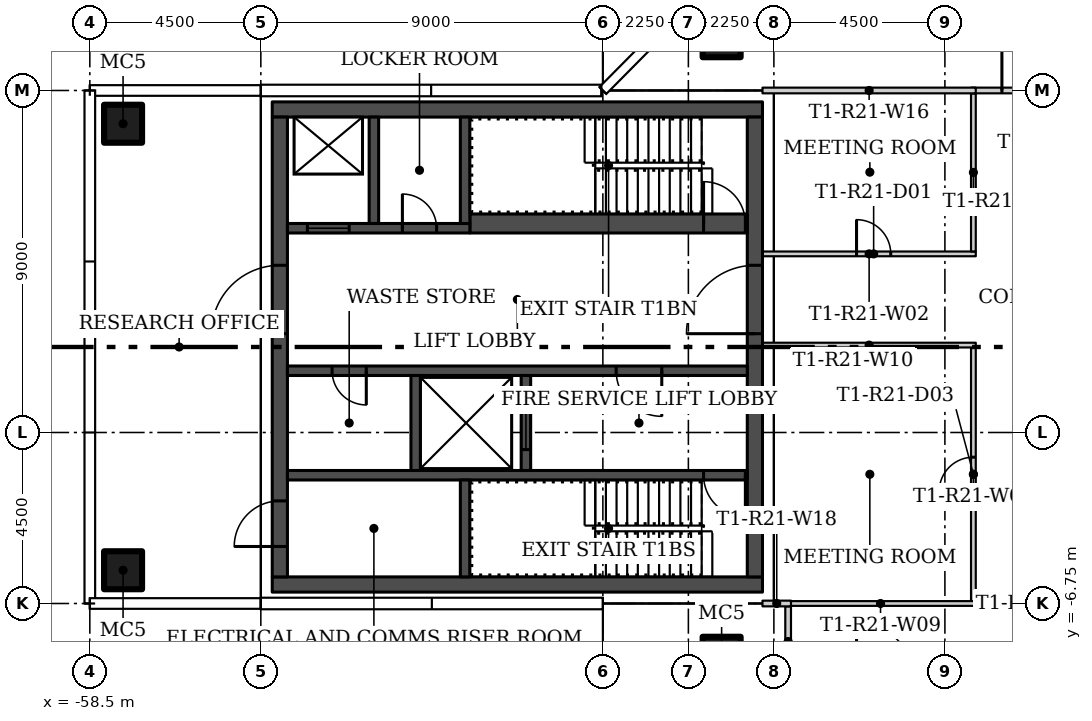
"""IFC4 building model, lengths in metres.
Left out: names, types, materials, properties, quantities, classifications, styles, units other than length and angle.
Written with IfcOpenShell. Run it as: python <this file> out.ifc"""

import sys

from ifc_helpers import new_model, si_unit, direction, frame, frame_2d, origin, origin_2d, place, context, subcontext, project, spatial, rectangle, hollow_rectangle, extrude, element, fill, save


model = new_model("IFC4")
c1 = context("Model", 3, precision=1e-05, world=origin(), true_north=direction((0.0, 1.0)))
c2 = subcontext(c1, "Body", "Model", "MODEL_VIEW")
j1 = project(units=[si_unit("LENGTHUNIT", "METRE"), si_unit("PLANEANGLEUNIT", "RADIAN")], contexts=[c1])
p1 = place(None, origin())
s1 = spatial("IfcSite", under=j1, at=p1, CompositionType="ELEMENT")
p2 = place(p1, origin())
s2 = spatial("IfcBuilding", under=s1, at=p2, CompositionType="ELEMENT")
p3 = place(p2, frame((0.0, 0.0, 194.4)))
s3 = spatial("IfcBuildingStorey", under=s2, at=p3, CompositionType="ELEMENT", Elevation=194.4)
for number, where in (
    (1, (-41.875, 8.125, 0.0)),
    (2, (-41.875, -8.125, 0.0)),
    (3, (-57.625, -5.875, 0.0)),
    (4, (-57.625, 5.875, 0.0)),
):
    element("IfcColumn", number, at=place(p3, frame(where)), inside=s3, PredefinedType="COLUMN", context=c2, shape_type="SweptSolid", body=[
        extrude(hollow_rectangle(XDim=1.0, YDim=1.0, WallThickness=0.04, at=origin_2d()), origin(), (0.0, 0.0, 1.0), 3.55),
    ])
p4 = place(p3, frame((-40.8, 2.45, 0.0)))
e5 = element("IfcWall", 5, at=p4, inside=s3, PredefinedType="PARTITIONING", context=c2, shape_type="SweptSolid", body=[
    extrude(rectangle(XDim=5.613, YDim=0.125, at=frame_2d((2.806, 0.0))), origin(), (0.0, 0.0, 1.0), 3.55),
])
p5 = place(p4, frame((2.475, 0.0, 0.0)))
e6 = element("IfcOpeningElement", 6, at=p5, cuts=e5, PredefinedType="OPENING", context=c2, shape_type="SweptSolid", body=[
    extrude(rectangle(XDim=0.9, YDim=2.1, at=frame_2d((0.45, 1.05))), frame((0.0, 0.073, 0.0), z_axis=(0.0, -1.0, 0.0), x_axis=(1.0, 0.0, 0.0)), (0.0, 0.0, 1.0), 0.145),
])
p6 = place(p3, frame((-35.25, -6.688, 0.0), z_axis=(0.0, 0.0, 1.0), x_axis=(0.0, 1.0, 0.0)))
e7 = element("IfcWall", 7, at=p6, inside=s3, PredefinedType="PARTITIONING", context=c2, shape_type="SweptSolid", body=[
    extrude(rectangle(XDim=6.675, YDim=0.125, at=frame_2d((3.337, 0.0))), origin(), (0.0, 0.0, 1.0), 3.55),
])
p7 = place(p6, frame((2.887, 0.0, 0.0)))
e8 = element("IfcOpeningElement", 8, at=p7, cuts=e7, PredefinedType="OPENING", context=c2, shape_type="SweptSolid", body=[
    extrude(rectangle(XDim=0.9, YDim=2.1, at=frame_2d((0.45, 1.05))), frame((0.0, 0.073, 0.0), z_axis=(0.0, -1.0, 0.0), x_axis=(1.0, 0.0, 0.0)), (0.0, 0.0, 1.0), 0.145),
])
p8 = place(p3, frame((-35.25, 2.513, 0.0), z_axis=(0.0, 0.0, 1.0), x_axis=(0.0, 1.0, 0.0)))
e9 = element("IfcWall", 9, at=p8, inside=s3, PredefinedType="PARTITIONING", context=c2, shape_type="SweptSolid", body=[
    extrude(rectangle(XDim=4.162, YDim=0.125, at=frame_2d((2.081, 0.0))), origin(), (0.0, 0.0, 1.0), 3.55),
])
p9 = place(p3, frame((-40.2, -6.75, 0.0)))
e10 = element("IfcWall", 10, at=p9, inside=s3, PredefinedType="PARTITIONING", context=c2, shape_type="SweptSolid", body=[
    extrude(rectangle(XDim=5.012, YDim=0.125, at=frame_2d((2.506, 0.0))), origin(), (0.0, 0.0, 1.0), 3.55),
])
p10 = place(p3, frame((-35.188, 0.05, 0.0), z_axis=(0.0, 0.0, 1.0), x_axis=(-1.0, 0.0, 0.0)))
e11 = element("IfcWall", 11, at=p10, inside=s3, PredefinedType="PARTITIONING", context=c2, shape_type="SweptSolid", body=[
    extrude(rectangle(XDim=5.613, YDim=0.125, at=frame_2d((2.806, 0.0))), origin(), (0.0, 0.0, 1.0), 3.55),
])
p11 = place(p3, frame((-35.312, 6.75, 0.0)))
e12 = element("IfcWall", 12, at=p11, inside=s3, PredefinedType="PARTITIONING", context=c2, shape_type="SweptSolid", body=[
    extrude(rectangle(XDim=3.125, YDim=0.15, at=frame_2d((1.562, 0.0))), origin(), (0.0, 0.0, 1.0), 3.55),
])
p12 = place(p11, frame((0.812, 0.0, 0.0)))
e13 = element("IfcOpeningElement", 13, at=p12, cuts=e12, PredefinedType="OPENING", context=c2, shape_type="SweptSolid", body=[
    extrude(rectangle(XDim=1.5, YDim=2.1, at=frame_2d((0.75, 1.05))), frame((0.0, 0.085, 0.0), z_axis=(0.0, -1.0, 0.0), x_axis=(1.0, 0.0, 0.0)), (0.0, 0.0, 1.0), 0.17),
])
p13 = place(p3, frame((-40.125, -6.825, 0.0), z_axis=(0.0, 0.0, 1.0), x_axis=(0.0, -1.0, 0.0)))
e14 = element("IfcWall", 14, at=p13, inside=s3, PredefinedType="PARTITIONING", context=c2, shape_type="SweptSolid", body=[
    extrude(rectangle(XDim=1.85, YDim=0.15, at=frame_2d((0.925, 0.0))), origin(), (0.0, 0.0, 1.0), 3.55),
])
p14 = place(p3, frame((-35.188, 6.75, 0.0), z_axis=(0.0, 0.0, 1.0), x_axis=(-1.0, 0.0, 0.0)))
e15 = element("IfcWall", 15, at=p14, inside=s3, PredefinedType="PARTITIONING", context=c2, shape_type="SweptSolid", body=[
    extrude(rectangle(XDim=5.613, YDim=0.15, at=frame_2d((2.806, 0.0))), origin(), (0.0, 0.0, 1.0), 3.55),
])
p15 = place(p3, frame((-40.8, -6.75, 0.0)))
e16 = element("IfcWall", 16, at=p15, inside=s3, PredefinedType="PARTITIONING", context=c2, shape_type="SweptSolid", body=[
    extrude(rectangle(XDim=0.75, YDim=0.15, at=frame_2d((0.375, 0.0))), origin(), (0.0, 0.0, 1.0), 3.55),
])
for number, where, z_axis, x_axis in (
    (17, (-40.8, -6.25, 0.0), (0.0, 0.0, 1.0), (-1.0, 0.0, 0.0)),
    (18, (-40.8, 6.25, 0.0), (0.0, 0.0, 1.0), (-1.0, 0.0, 0.0)),
):
    element("IfcWall", number, at=place(p3, frame(where, z_axis=z_axis, x_axis=x_axis)), inside=s3, PredefinedType="SHEAR", context=c2, shape_type="SweptSolid", body=[
        extrude(rectangle(XDim=12.9, YDim=0.4, at=frame_2d((6.45, 0.0))), origin(), (0.0, 0.0, 1.0), 3.55),
    ])
p16 = place(p3, frame((-41.0, -6.05, 0.0), z_axis=(0.0, 0.0, 1.0), x_axis=(0.0, 1.0, 0.0)))
e19 = element("IfcWall", 19, at=p16, inside=s3, PredefinedType="SHEAR", context=c2, shape_type="SweptSolid", body=[
    extrude(rectangle(XDim=12.1, YDim=0.4, at=frame_2d((6.05, 0.0))), origin(), (0.0, 0.0, 1.0), 3.55),
])
p17 = place(p16, frame((6.4, 0.0, 0.0)))
e20 = element("IfcOpeningElement", 20, at=p17, cuts=e19, PredefinedType="OPENING", context=c2, shape_type="SweptSolid", body=[
    extrude(rectangle(XDim=1.8, YDim=2.4, at=frame_2d((0.9, 1.2))), frame((0.0, 0.21, 0.0), z_axis=(0.0, -1.0, 0.0), x_axis=(1.0, 0.0, 0.0)), (0.0, 0.0, 1.0), 0.42),
])
p18 = place(p3, frame((-53.5, -6.05, 0.0), z_axis=(0.0, 0.0, 1.0), x_axis=(0.0, 1.0, 0.0)))
e21 = element("IfcWall", 21, at=p18, inside=s3, PredefinedType="SHEAR", context=c2, shape_type="SweptSolid", body=[
    extrude(rectangle(XDim=12.1, YDim=0.4, at=frame_2d((6.05, 0.0))), origin(), (0.0, 0.0, 1.0), 3.55),
])
p19 = place(p18, frame((0.8, 0.0, 0.0)))
e22 = element("IfcOpeningElement", 22, at=p19, cuts=e21, PredefinedType="OPENING", context=c2, shape_type="SweptSolid", body=[
    extrude(rectangle(XDim=1.2, YDim=2.1, at=frame_2d((0.6, 1.05))), frame((0.0, 0.21, 0.0), z_axis=(0.0, -1.0, 0.0), x_axis=(1.0, 0.0, 0.0)), (0.0, 0.0, 1.0), 0.42),
])
p20 = place(p18, frame((6.4, 0.0, 0.0)))
e23 = element("IfcOpeningElement", 23, at=p20, cuts=e21, PredefinedType="OPENING", context=c2, shape_type="SweptSolid", body=[
    extrude(rectangle(XDim=1.8, YDim=2.4, at=frame_2d((0.9, 1.2))), frame((0.0, 0.21, 0.0), z_axis=(0.0, -1.0, 0.0), x_axis=(1.0, 0.0, 0.0)), (0.0, 0.0, 1.0), 0.42),
])
p21 = place(p3, frame((-41.2, -3.375, 0.0), z_axis=(0.0, 0.0, 1.0), x_axis=(-1.0, 0.0, 0.0)))
e24 = element("IfcWall", 24, at=p21, inside=s3, PredefinedType="SHEAR", context=c2, shape_type="SweptSolid", body=[
    extrude(rectangle(XDim=12.1, YDim=0.25, at=frame_2d((6.05, 0.0))), origin(), (0.0, 0.0, 1.0), 3.55),
])
p22 = place(p21, frame((0.05, 0.0, 0.0)))
e25 = element("IfcOpeningElement", 25, at=p22, cuts=e24, PredefinedType="OPENING", context=c2, shape_type="SweptSolid", body=[
    extrude(rectangle(XDim=1.1, YDim=2.1, at=frame_2d((0.55, 1.05))), frame((0.0, 0.135, 0.0), z_axis=(0.0, -1.0, 0.0), x_axis=(1.0, 0.0, 0.0)), (0.0, 0.0, 1.0), 0.27),
])
p23 = place(p3, frame((-48.625, -6.05, 0.0), z_axis=(0.0, 0.0, 1.0), x_axis=(0.0, 1.0, 0.0)))
e26 = element("IfcWall", 26, at=p23, inside=s3, PredefinedType="SHEAR", context=c2, shape_type="SweptSolid", body=[
    extrude(rectangle(XDim=2.55, YDim=0.25, at=frame_2d((1.275, 0.0))), origin(), (0.0, 0.0, 1.0), 3.55),
])
p24 = place(p3, frame((-41.2, -0.625, 0.0), z_axis=(0.0, 0.0, 1.0), x_axis=(-1.0, 0.0, 0.0)))
e27 = element("IfcWall", 27, at=p24, inside=s3, PredefinedType="SHEAR", context=c2, shape_type="SweptSolid", body=[
    extrude(rectangle(XDim=12.1, YDim=0.25, at=frame_2d((6.05, 0.0))), origin(), (0.0, 0.0, 1.0), 3.55),
])
p25 = place(p24, frame((2.25, 0.0, 0.0)))
e28 = element("IfcOpeningElement", 28, at=p25, cuts=e27, PredefinedType="OPENING", context=c2, shape_type="SweptSolid", body=[
    extrude(rectangle(XDim=1.2, YDim=2.1, at=frame_2d((0.6, 1.05))), frame((0.0, 0.135, 0.0), z_axis=(0.0, -1.0, 0.0), x_axis=(1.0, 0.0, 0.0)), (0.0, 0.0, 1.0), 0.27),
])
p26 = place(p24, frame((10.025, 0.0, 0.0)))
e29 = element("IfcOpeningElement", 29, at=p26, cuts=e27, PredefinedType="OPENING", context=c2, shape_type="SweptSolid", body=[
    extrude(rectangle(XDim=0.9, YDim=2.1, at=frame_2d((0.45, 1.05))), frame((0.0, 0.135, 0.0), z_axis=(0.0, -1.0, 0.0), x_axis=(1.0, 0.0, 0.0)), (0.0, 0.0, 1.0), 0.27),
])
p27 = place(p3, frame((-47.025, -3.25, 0.0), z_axis=(0.0, 0.0, 1.0), x_axis=(0.0, 1.0, 0.0)))
e30 = element("IfcWall", 30, at=p27, inside=s3, PredefinedType="SHEAR", context=c2, shape_type="SweptSolid", body=[
    extrude(rectangle(XDim=2.5, YDim=0.25, at=frame_2d((1.25, 0.0))), origin(), (0.0, 0.0, 1.0), 3.55),
])
p28 = place(p27, frame((0.55, 0.0, 0.0)))
e31 = element("IfcOpeningElement", 31, at=p28, cuts=e30, PredefinedType="OPENING", context=c2, shape_type="SweptSolid", body=[
    extrude(rectangle(XDim=1.4, YDim=2.4, at=frame_2d((0.7, 1.2))), frame((0.0, 0.135, 0.0), z_axis=(0.0, -1.0, 0.0), x_axis=(1.0, 0.0, 0.0)), (0.0, 0.0, 1.0), 0.27),
])
p29 = place(p3, frame((-49.925, -3.25, 0.0), z_axis=(0.0, 0.0, 1.0), x_axis=(0.0, 1.0, 0.0)))
e32 = element("IfcWall", 32, at=p29, inside=s3, PredefinedType="SHEAR", context=c2, shape_type="SweptSolid", body=[
    extrude(rectangle(XDim=2.5, YDim=0.25, at=frame_2d((1.25, 0.0))), origin(), (0.0, 0.0, 1.0), 3.55),
])
p30 = place(p3, frame((-48.5, 3.25, 0.0)))
e33 = element("IfcWall", 33, at=p30, inside=s3, PredefinedType="SHEAR", context=c2, shape_type="SweptSolid", body=[
    extrude(rectangle(XDim=7.3, YDim=0.5, at=frame_2d((3.65, 0.0))), origin(), (0.0, 0.0, 1.0), 3.55),
])
p31 = place(p30, frame((6.15, 0.0, 0.0)))
e34 = element("IfcOpeningElement", 34, at=p31, cuts=e33, PredefinedType="OPENING", context=c2, shape_type="SweptSolid", body=[
    extrude(rectangle(XDim=1.1, YDim=2.1, at=frame_2d((0.55, 1.05))), frame((0.0, 0.26, 0.0), z_axis=(0.0, -1.0, 0.0), x_axis=(1.0, 0.0, 0.0)), (0.0, 0.0, 1.0), 0.52),
])
p32 = place(p3, frame((-53.3, 3.125, 0.0)))
e35 = element("IfcWall", 35, at=p32, inside=s3, PredefinedType="SHEAR", context=c2, shape_type="SweptSolid", body=[
    extrude(rectangle(XDim=4.8, YDim=0.25, at=frame_2d((2.4, 0.0))), origin(), (0.0, 0.0, 1.0), 3.55),
])
p33 = place(p32, frame((0.525, 0.0, 0.0)))
e36 = element("IfcOpeningElement", 36, at=p33, cuts=e35, PredefinedType="OPENING", context=c2, shape_type="SweptSolid", body=[
    extrude(rectangle(XDim=1.1, YDim=2.1, at=frame_2d((0.55, 1.05))), frame((0.0, 0.135, 0.0), z_axis=(0.0, -1.0, 0.0), x_axis=(1.0, 0.0, 0.0)), (0.0, 0.0, 1.0), 0.27),
])
p34 = place(p32, frame((3.025, 0.0, 0.0)))
e37 = element("IfcOpeningElement", 37, at=p34, cuts=e35, PredefinedType="OPENING", context=c2, shape_type="SweptSolid", body=[
    extrude(rectangle(XDim=0.9, YDim=2.1, at=frame_2d((0.45, 1.05))), frame((0.0, 0.135, 0.0), z_axis=(0.0, -1.0, 0.0), x_axis=(1.0, 0.0, 0.0)), (0.0, 0.0, 1.0), 0.27),
])
for number, where, z_axis, x_axis in (
    (38, (-48.625, 3.25, 0.0), (0.0, 0.0, 1.0), (0.0, 1.0, 0.0)),
    (39, (-51.025, 3.25, 0.0), (0.0, 0.0, 1.0), (0.0, 1.0, 0.0)),
):
    element("IfcWall", number, at=place(p3, frame(where, z_axis=z_axis, x_axis=x_axis)), inside=s3, PredefinedType="SHEAR", context=c2, shape_type="SweptSolid", body=[
        extrude(rectangle(XDim=2.8, YDim=0.25, at=frame_2d((1.4, 0.0))), origin(), (0.0, 0.0, 1.0), 3.55),
    ])
p35 = place(p5, origin())
e40 = element("IfcDoor", 40, at=p35, inside=s3, OperationType="SINGLE_SWING_LEFT", PredefinedType="DOOR", context=c2, shape_type="SweptSolid", body=[
    extrude(rectangle(XDim=0.9, YDim=2.1, at=frame_2d((0.45, 1.05))), frame((0.0, 0.025, 0.0), z_axis=(0.0, -1.0, 0.0), x_axis=(1.0, 0.0, 0.0)), (0.0, 0.0, 1.0), 0.05),
])
fill(e6, e40)
p36 = place(p7, origin())
e41 = element("IfcDoor", 41, at=p36, inside=s3, OperationType="SINGLE_SWING_LEFT", PredefinedType="DOOR", context=c2, shape_type="SweptSolid", body=[
    extrude(rectangle(XDim=0.9, YDim=2.1, at=frame_2d((0.45, 1.05))), frame((0.0, 0.025, 0.0), z_axis=(0.0, -1.0, 0.0), x_axis=(1.0, 0.0, 0.0)), (0.0, 0.0, 1.0), 0.05),
])
fill(e8, e41)
p37 = place(p12, origin())
e42 = element("IfcDoor", 42, at=p37, inside=s3, OperationType="DOUBLE_DOOR_SINGLE_SWING", PredefinedType="DOOR", context=c2, shape_type="SweptSolid", body=[
    extrude(rectangle(XDim=1.5, YDim=2.1, at=frame_2d((0.75, 1.05))), frame((0.0, 0.025, 0.0), z_axis=(0.0, -1.0, 0.0), x_axis=(1.0, 0.0, 0.0)), (0.0, 0.0, 1.0), 0.05),
])
fill(e13, e42)
p38 = place(p17, origin())
e43 = element("IfcDoor", 43, at=p38, inside=s3, OperationType="DOUBLE_DOOR_SINGLE_SWING", PredefinedType="DOOR", context=c2, shape_type="SweptSolid", body=[
    extrude(rectangle(XDim=1.8, YDim=2.4, at=frame_2d((0.9, 1.2))), frame((0.0, 0.025, 0.0), z_axis=(0.0, -1.0, 0.0), x_axis=(1.0, 0.0, 0.0)), (0.0, 0.0, 1.0), 0.05),
])
fill(e20, e43)
p39 = place(p19, origin())
e44 = element("IfcDoor", 44, at=p39, inside=s3, OperationType="SINGLE_SWING_LEFT", PredefinedType="DOOR", context=c2, shape_type="SweptSolid", body=[
    extrude(rectangle(XDim=1.2, YDim=2.1, at=frame_2d((0.6, 1.05))), frame((0.0, 0.025, 0.0), z_axis=(0.0, -1.0, 0.0), x_axis=(1.0, 0.0, 0.0)), (0.0, 0.0, 1.0), 0.05),
])
fill(e22, e44)
p40 = place(p20, origin())
e45 = element("IfcDoor", 45, at=p40, inside=s3, OperationType="DOUBLE_DOOR_SINGLE_SWING", PredefinedType="DOOR", context=c2, shape_type="SweptSolid", body=[
    extrude(rectangle(XDim=1.8, YDim=2.4, at=frame_2d((0.9, 1.2))), frame((0.0, 0.025, 0.0), z_axis=(0.0, -1.0, 0.0), x_axis=(1.0, 0.0, 0.0)), (0.0, 0.0, 1.0), 0.05),
])
fill(e23, e45)
p41 = place(p22, origin())
e46 = element("IfcDoor", 46, at=p41, inside=s3, OperationType="SINGLE_SWING_LEFT", PredefinedType="DOOR", context=c2, shape_type="SweptSolid", body=[
    extrude(rectangle(XDim=1.1, YDim=2.1, at=frame_2d((0.55, 1.05))), frame((0.0, 0.025, 0.0), z_axis=(0.0, -1.0, 0.0), x_axis=(1.0, 0.0, 0.0)), (0.0, 0.0, 1.0), 0.05),
])
fill(e25, e46)
p42 = place(p25, origin())
e47 = element("IfcDoor", 47, at=p42, inside=s3, OperationType="SINGLE_SWING_LEFT", PredefinedType="DOOR", context=c2, shape_type="SweptSolid", body=[
    extrude(rectangle(XDim=1.2, YDim=2.1, at=frame_2d((0.6, 1.05))), frame((0.0, 0.025, 0.0), z_axis=(0.0, -1.0, 0.0), x_axis=(1.0, 0.0, 0.0)), (0.0, 0.0, 1.0), 0.05),
])
fill(e28, e47)
p43 = place(p26, origin())
e48 = element("IfcDoor", 48, at=p43, inside=s3, OperationType="SINGLE_SWING_RIGHT", PredefinedType="DOOR", context=c2, shape_type="SweptSolid", body=[
    extrude(rectangle(XDim=0.9, YDim=2.1, at=frame_2d((0.45, 1.05))), frame((0.0, 0.025, 0.0), z_axis=(0.0, -1.0, 0.0), x_axis=(1.0, 0.0, 0.0)), (0.0, 0.0, 1.0), 0.05),
])
fill(e29, e48)
p44 = place(p28, origin())
e49 = element("IfcDoor", 49, at=p44, inside=s3, OperationType="SLIDING_TO_LEFT", PredefinedType="DOOR", context=c2, shape_type="SweptSolid", body=[
    extrude(rectangle(XDim=1.4, YDim=2.4, at=frame_2d((0.7, 1.2))), frame((0.0, 0.025, 0.0), z_axis=(0.0, -1.0, 0.0), x_axis=(1.0, 0.0, 0.0)), (0.0, 0.0, 1.0), 0.05),
])
fill(e31, e49)
p45 = place(p31, origin())
e50 = element("IfcDoor", 50, at=p45, inside=s3, OperationType="SINGLE_SWING_RIGHT", PredefinedType="DOOR", context=c2, shape_type="SweptSolid", body=[
    extrude(rectangle(XDim=1.1, YDim=2.1, at=frame_2d((0.55, 1.05))), frame((0.0, 0.025, 0.0), z_axis=(0.0, -1.0, 0.0), x_axis=(1.0, 0.0, 0.0)), (0.0, 0.0, 1.0), 0.05),
])
fill(e34, e50)
p46 = place(p33, origin())
e51 = element("IfcDoor", 51, at=p46, inside=s3, OperationType="SLIDING_TO_LEFT", PredefinedType="DOOR", context=c2, shape_type="SweptSolid", body=[
    extrude(rectangle(XDim=1.1, YDim=2.1, at=frame_2d((0.55, 1.05))), frame((0.0, 0.025, 0.0), z_axis=(0.0, -1.0, 0.0), x_axis=(1.0, 0.0, 0.0)), (0.0, 0.0, 1.0), 0.05),
])
fill(e36, e51)
p47 = place(p34, origin())
e52 = element("IfcDoor", 52, at=p47, inside=s3, OperationType="SINGLE_SWING_RIGHT", PredefinedType="DOOR", context=c2, shape_type="SweptSolid", body=[
    extrude(rectangle(XDim=0.9, YDim=2.1, at=frame_2d((0.45, 1.05))), frame((0.0, 0.025, 0.0), z_axis=(0.0, -1.0, 0.0), x_axis=(1.0, 0.0, 0.0)), (0.0, 0.0, 1.0), 0.05),
])
fill(e37, e52)
save(model, sys.argv[1])
